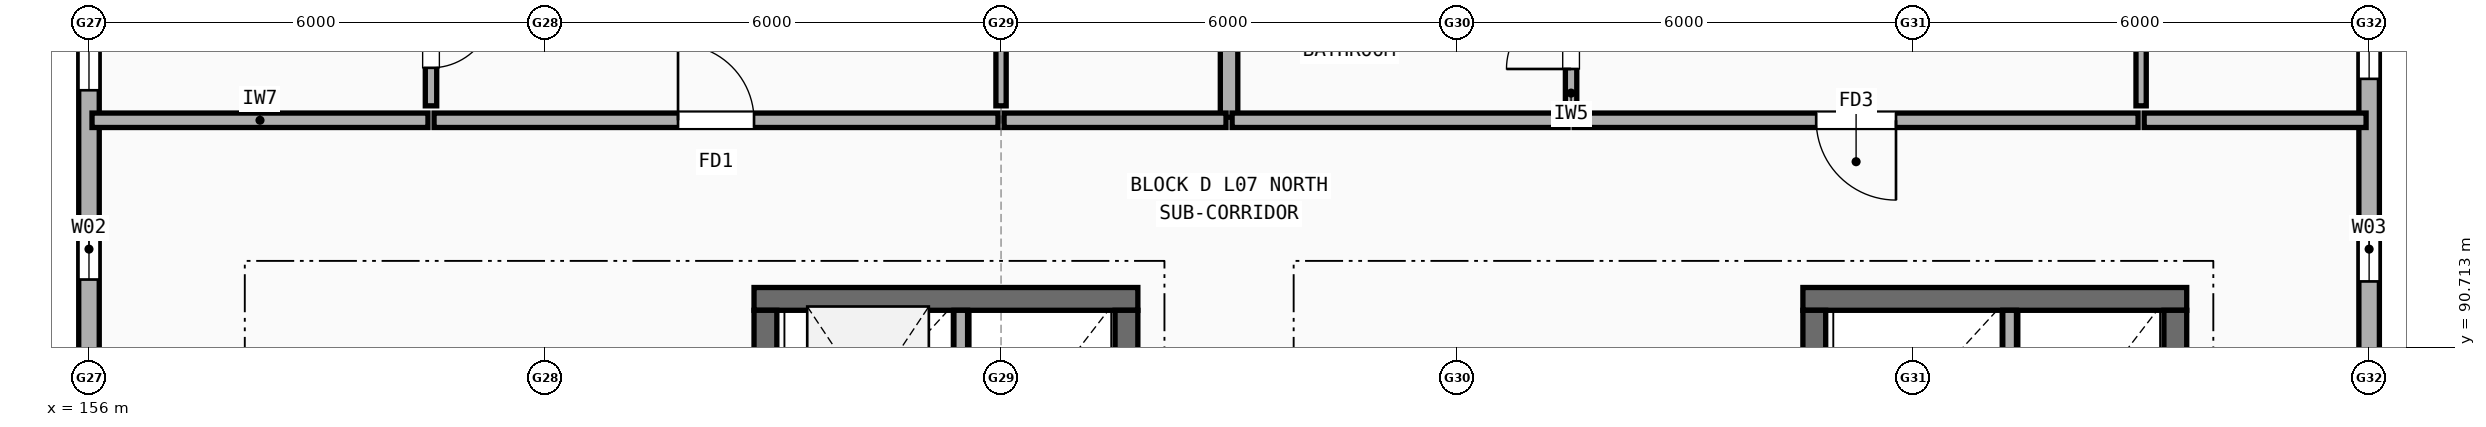
"""IFC4 building model, lengths in metres.
Left out: names, types, materials, properties, quantities, classifications, styles, units other than length and angle.
Written with IfcOpenShell. Run it as: python <this file> out.ifc"""

import sys

from ifc_helpers import new_model, si_unit, direction, frame, frame_2d, origin, place, context, subcontext, project, spatial, rectangle, extrude, element, fill, save


model = new_model("IFC4")
c1 = context("Model", 3, precision=1e-05, world=origin(), true_north=direction((0.0, 1.0)))
c2 = subcontext(c1, "Body", "Model", "MODEL_VIEW")
j1 = project(units=[si_unit("LENGTHUNIT", "METRE"), si_unit("PLANEANGLEUNIT", "RADIAN")], contexts=[c1])
p1 = place(None, origin())
s1 = spatial("IfcSite", under=j1, at=p1, CompositionType="ELEMENT")
p2 = place(p1, origin())
s2 = spatial("IfcBuilding", under=s1, at=p2, CompositionType="ELEMENT")
p3 = place(p2, frame((0.0, 0.0, 23.7)))
s3 = spatial("IfcBuildingStorey", under=s2, at=p3, CompositionType="ELEMENT", Elevation=23.7)
p4 = place(p3, frame((186.0, 90.35, 0.0), z_axis=(0.0, 0.0, 1.0), x_axis=(0.0, 1.0, 0.0)))
e1 = element("IfcWall", 1, at=p4, inside=s3, PredefinedType="STANDARD", context=c2, shape_type="SweptSolid", body=[
    extrude(rectangle(XDim=5.3, YDim=0.27, at=frame_2d((2.65, 0.0))), origin(), (0.0, 0.0, 1.0), 2.457),
])
p5 = place(p4, frame((1.23, 0.0, 0.9)))
e2 = element("IfcOpeningElement", 2, at=p5, cuts=e1, PredefinedType="OPENING", context=c2, shape_type="SweptSolid", body=[
    extrude(rectangle(XDim=0.85, YDim=1.25, at=frame_2d((0.425, 0.625))), frame((0.0, 0.145, 0.0), z_axis=(0.0, -1.0, 0.0), x_axis=(1.0, 0.0, 0.0)), (0.0, 0.0, 1.0), 0.29),
])
p6 = place(p4, frame((3.895, 0.0, 0.9)))
e3 = element("IfcOpeningElement", 3, at=p6, cuts=e1, PredefinedType="OPENING", context=c2, shape_type="SweptSolid", body=[
    extrude(rectangle(XDim=0.9, YDim=1.3, at=frame_2d((0.45, 0.65))), frame((0.0, 0.145, 0.0), z_axis=(0.0, -1.0, 0.0), x_axis=(1.0, 0.0, 0.0)), (0.0, 0.0, 1.0), 0.29),
])
p7 = place(p3, frame((156.0, 95.65, 0.0), z_axis=(0.0, 0.0, 1.0), x_axis=(0.0, -1.0, 0.0)))
e4 = element("IfcWall", 4, at=p7, inside=s3, PredefinedType="STANDARD", context=c2, shape_type="SweptSolid", body=[
    extrude(rectangle(XDim=5.3, YDim=0.27, at=frame_2d((2.65, 0.0))), origin(), (0.0, 0.0, 1.0), 2.457),
])
p8 = place(p7, frame((0.355, 0.0, 0.9)))
e5 = element("IfcOpeningElement", 5, at=p8, cuts=e4, PredefinedType="OPENING", context=c2, shape_type="SweptSolid", body=[
    extrude(rectangle(XDim=1.2, YDim=1.35, at=frame_2d((0.6, 0.675))), frame((0.0, 0.145, 0.0), z_axis=(0.0, -1.0, 0.0), x_axis=(1.0, 0.0, 0.0)), (0.0, 0.0, 1.0), 0.29),
])
p9 = place(p7, frame((3.245, 0.0, 0.9)))
e6 = element("IfcOpeningElement", 6, at=p9, cuts=e4, PredefinedType="OPENING", context=c2, shape_type="SweptSolid", body=[
    extrude(rectangle(XDim=0.8, YDim=1.2, at=frame_2d((0.4, 0.6))), frame((0.0, 0.145, 0.0), z_axis=(0.0, -1.0, 0.0), x_axis=(1.0, 0.0, 0.0)), (0.0, 0.0, 1.0), 0.29),
])
p10 = place(p3, frame((169.8, 91.35, 0.0), z_axis=(0.0, 0.0, 1.0), x_axis=(-1.0, 0.0, 0.0)))
e7 = element("IfcWall", 7, at=p10, inside=s3, PredefinedType="SHEAR", context=c2, shape_type="SweptSolid", body=[
    extrude(rectangle(XDim=5.05, YDim=0.3, at=frame_2d((2.525, 0.0))), origin(), (0.0, 0.0, 1.0), 2.975),
])
p11 = place(p3, frame((169.65, 84.75, 0.0), z_axis=(0.0, 0.0, 1.0), x_axis=(0.0, 1.0, 0.0)))
e8 = element("IfcWall", 8, at=p11, inside=s3, PredefinedType="SHEAR", context=c2, shape_type="SweptSolid", body=[
    extrude(rectangle(XDim=6.45, YDim=0.3, at=frame_2d((3.225, 0.0))), origin(), (0.0, 0.0, 1.0), 2.975),
])
p12 = place(p3, frame((164.9, 87.75, 0.0), z_axis=(0.0, 0.0, 1.0), x_axis=(0.0, 1.0, 0.0)))
e9 = element("IfcWall", 9, at=p12, inside=s3, PredefinedType="SHEAR", context=c2, shape_type="SweptSolid", body=[
    extrude(rectangle(XDim=3.45, YDim=0.3, at=frame_2d((1.725, 0.0))), origin(), (0.0, 0.0, 1.0), 2.975),
])
p13 = place(p3, frame((167.47, 88.94, 0.0), z_axis=(0.0, 0.0, 1.0), x_axis=(0.0, 1.0, 0.0)))
e10 = element("IfcWall", 10, at=p13, inside=s3, PredefinedType="SOLIDWALL", context=c2, shape_type="SweptSolid", body=[
    extrude(rectangle(XDim=2.26, YDim=0.18, at=frame_2d((1.13, 0.0))), origin(), (0.0, 0.0, 1.0), 2.975),
])
p14 = place(p3, frame((183.6, 91.35, 0.0), z_axis=(0.0, 0.0, 1.0), x_axis=(-1.0, 0.0, 0.0)))
e11 = element("IfcWall", 11, at=p14, inside=s3, PredefinedType="SHEAR", context=c2, shape_type="SweptSolid", body=[
    extrude(rectangle(XDim=5.05, YDim=0.3, at=frame_2d((2.525, 0.0))), origin(), (0.0, 0.0, 1.0), 2.975),
])
p15 = place(p3, frame((183.45, 84.75, 0.0), z_axis=(0.0, 0.0, 1.0), x_axis=(0.0, 1.0, 0.0)))
e12 = element("IfcWall", 12, at=p15, inside=s3, PredefinedType="SHEAR", context=c2, shape_type="SweptSolid", body=[
    extrude(rectangle(XDim=6.45, YDim=0.3, at=frame_2d((3.225, 0.0))), origin(), (0.0, 0.0, 1.0), 2.975),
])
p16 = place(p3, frame((178.7, 87.65, 0.0), z_axis=(0.0, 0.0, 1.0), x_axis=(0.0, 1.0, 0.0)))
e13 = element("IfcWall", 13, at=p16, inside=s3, PredefinedType="SHEAR", context=c2, shape_type="SweptSolid", body=[
    extrude(rectangle(XDim=3.55, YDim=0.3, at=frame_2d((1.775, 0.0))), origin(), (0.0, 0.0, 1.0), 2.975),
])
p17 = place(p3, frame((181.27, 88.94, 0.0), z_axis=(0.0, 0.0, 1.0), x_axis=(0.0, 1.0, 0.0)))
e14 = element("IfcWall", 14, at=p17, inside=s3, PredefinedType="SOLIDWALL", context=c2, shape_type="SweptSolid", body=[
    extrude(rectangle(XDim=2.26, YDim=0.18, at=frame_2d((1.13, 0.0))), origin(), (0.0, 0.0, 1.0), 2.975),
])
p18 = place(p3, frame((171.0, 93.74, 0.0), z_axis=(0.0, 0.0, 1.0), x_axis=(0.0, 1.0, 0.0)))
e15 = element("IfcWall", 15, at=p18, inside=s3, PredefinedType="SOLIDWALL", context=c2, shape_type="SweptSolid", body=[
    extrude(rectangle(XDim=7.87, YDim=0.23, at=frame_2d((3.935, 0.0))), origin(), (0.0, 0.0, 1.0), 2.548),
])
p19 = place(p3, frame((156.04, 93.7, 0.0), z_axis=(0.0, 0.0, 1.0), x_axis=(1.0, 0.0, 0.0)))
e16 = element("IfcWall", 16, at=p19, inside=s3, PredefinedType="SOLIDWALL", context=c2, shape_type="SweptSolid", body=[
    extrude(rectangle(XDim=4.42, YDim=0.19, at=frame_2d((2.21, 0.0))), origin(), (0.0, 0.0, 1.0), 2.457),
])
p20 = place(p3, frame((160.54, 93.7, 0.0), z_axis=(0.0, 0.0, 1.0), x_axis=(1.0, 0.0, 0.0)))
e17 = element("IfcWall", 17, at=p20, inside=s3, PredefinedType="SOLIDWALL", context=c2, shape_type="SweptSolid", body=[
    extrude(rectangle(XDim=7.42, YDim=0.19, at=frame_2d((3.71, 0.0))), origin(), (0.0, 0.0, 1.0), 2.508),
])
p21 = place(p20, frame((3.21, 0.0, 0.0)))
e18 = element("IfcOpeningElement", 18, at=p21, cuts=e17, PredefinedType="OPENING", context=c2, shape_type="SweptSolid", body=[
    extrude(rectangle(XDim=1.0, YDim=2.15, at=frame_2d((0.5, 1.075))), frame((0.0, 0.105, 0.0), z_axis=(0.0, -1.0, 0.0), x_axis=(1.0, 0.0, 0.0)), (0.0, 0.0, 1.0), 0.21),
])
p22 = place(p3, frame((160.5, 93.89, 0.0), z_axis=(0.0, 0.0, 1.0), x_axis=(0.0, 1.0, 0.0)))
e19 = element("IfcWall", 19, at=p22, inside=s3, PredefinedType="PARTITIONING", context=c2, shape_type="SweptSolid", body=[
    extrude(rectangle(XDim=1.82, YDim=0.15, at=frame_2d((0.91, 0.0))), origin(), (0.0, 0.0, 1.0), 2.975),
])
p23 = place(p22, frame((0.5, 0.0, 0.0)))
e20 = element("IfcOpeningElement", 20, at=p23, cuts=e19, PredefinedType="OPENING", context=c2, shape_type="SweptSolid", body=[
    extrude(rectangle(XDim=0.82, YDim=2.08, at=frame_2d((0.41, 1.04))), frame((0.0, 0.085, 0.0), z_axis=(0.0, -1.0, 0.0), x_axis=(1.0, 0.0, 0.0)), (0.0, 0.0, 1.0), 0.17),
])
p24 = place(p3, frame((168.04, 93.7, 0.0), z_axis=(0.0, 0.0, 1.0), x_axis=(1.0, 0.0, 0.0)))
e21 = element("IfcWall", 21, at=p24, inside=s3, PredefinedType="SOLIDWALL", context=c2, shape_type="SweptSolid", body=[
    extrude(rectangle(XDim=2.92, YDim=0.19, at=frame_2d((1.46, 0.0))), origin(), (0.0, 0.0, 1.0), 2.508),
])
p25 = place(p3, frame((168.0, 93.89, 0.0), z_axis=(0.0, 0.0, 1.0), x_axis=(0.0, 1.0, 0.0)))
e22 = element("IfcWall", 22, at=p25, inside=s3, PredefinedType="PARTITIONING", context=c2, shape_type="SweptSolid", body=[
    extrude(rectangle(XDim=7.6, YDim=0.135, at=frame_2d((3.8, 0.0))), origin(), (0.0, 0.0, 1.0), 2.508),
])
p26 = place(p25, frame((3.65, 0.0, 0.0)))
e23 = element("IfcOpeningElement", 23, at=p26, cuts=e22, PredefinedType="OPENING", context=c2, shape_type="SweptSolid", body=[
    extrude(rectangle(XDim=0.88, YDim=2.1, at=frame_2d((0.44, 1.05))), frame((0.0, 0.077, 0.0), z_axis=(0.0, -1.0, 0.0), x_axis=(1.0, 0.0, 0.0)), (0.0, 0.0, 1.0), 0.155),
])
p27 = place(p3, frame((171.04, 93.7, 0.0), z_axis=(0.0, 0.0, 1.0), x_axis=(1.0, 0.0, 0.0)))
e24 = element("IfcWall", 24, at=p27, inside=s3, PredefinedType="SOLIDWALL", context=c2, shape_type="SweptSolid", body=[
    extrude(rectangle(XDim=4.42, YDim=0.19, at=frame_2d((2.21, 0.0))), origin(), (0.0, 0.0, 1.0), 2.975),
])
p28 = place(p3, frame((175.54, 93.7, 0.0), z_axis=(0.0, 0.0, 1.0), x_axis=(1.0, 0.0, 0.0)))
e25 = element("IfcWall", 25, at=p28, inside=s3, PredefinedType="SOLIDWALL", context=c2, shape_type="SweptSolid", body=[
    extrude(rectangle(XDim=7.42, YDim=0.19, at=frame_2d((3.71, 0.0))), origin(), (0.0, 0.0, 1.0), 2.975),
])
p29 = place(p28, frame((3.185, 0.0, 0.0)))
e26 = element("IfcOpeningElement", 26, at=p29, cuts=e25, PredefinedType="OPENING", context=c2, shape_type="SweptSolid", body=[
    extrude(rectangle(XDim=1.05, YDim=2.15, at=frame_2d((0.525, 1.075))), frame((0.0, 0.105, 0.0), z_axis=(0.0, -1.0, 0.0), x_axis=(1.0, 0.0, 0.0)), (0.0, 0.0, 1.0), 0.21),
])
p30 = place(p3, frame((175.5, 93.89, 0.0), z_axis=(0.0, 0.0, 1.0), x_axis=(0.0, 1.0, 0.0)))
e27 = element("IfcWall", 27, at=p30, inside=s3, PredefinedType="PARTITIONING", context=c2, shape_type="SweptSolid", body=[
    extrude(rectangle(XDim=1.82, YDim=0.15, at=frame_2d((0.91, 0.0))), origin(), (0.0, 0.0, 1.0), 2.975),
])
p31 = place(p30, frame((0.485, 0.0, 0.0)))
e28 = element("IfcOpeningElement", 28, at=p31, cuts=e27, PredefinedType="OPENING", context=c2, shape_type="SweptSolid", body=[
    extrude(rectangle(XDim=0.85, YDim=2.1, at=frame_2d((0.425, 1.05))), frame((0.0, 0.085, 0.0), z_axis=(0.0, -1.0, 0.0), x_axis=(1.0, 0.0, 0.0)), (0.0, 0.0, 1.0), 0.17),
])
p32 = place(p3, frame((183.04, 93.7, 0.0), z_axis=(0.0, 0.0, 1.0), x_axis=(1.0, 0.0, 0.0)))
e29 = element("IfcWall", 29, at=p32, inside=s3, PredefinedType="SOLIDWALL", context=c2, shape_type="SweptSolid", body=[
    extrude(rectangle(XDim=2.92, YDim=0.19, at=frame_2d((1.46, 0.0))), origin(), (0.0, 0.0, 1.0), 2.457),
])
p33 = place(p3, frame((183.0, 93.89, 0.0), z_axis=(0.0, 0.0, 1.0), x_axis=(0.0, 1.0, 0.0)))
e30 = element("IfcWall", 30, at=p33, inside=s3, PredefinedType="PARTITIONING", context=c2, shape_type="SweptSolid", body=[
    extrude(rectangle(XDim=7.92, YDim=0.135, at=frame_2d((3.96, 0.0))), origin(), (0.0, 0.0, 1.0), 2.408),
])
p34 = place(p33, frame((3.65, 0.0, 0.0)))
e31 = element("IfcOpeningElement", 31, at=p34, cuts=e30, PredefinedType="OPENING", context=c2, shape_type="SweptSolid", body=[
    extrude(rectangle(XDim=0.9, YDim=2.1, at=frame_2d((0.45, 1.05))), frame((0.0, 0.077, 0.0), z_axis=(0.0, -1.0, 0.0), x_axis=(1.0, 0.0, 0.0)), (0.0, 0.0, 1.0), 0.155),
])
p35 = place(p5, origin())
e32 = element("IfcWindow", 32, at=p35, inside=s3, PartitioningType="SINGLE_PANEL", PredefinedType="WINDOW", context=c2, shape_type="SweptSolid", body=[
    extrude(rectangle(XDim=0.85, YDim=1.25, at=frame_2d((0.425, 0.625))), frame((0.0, 0.03, 0.0), z_axis=(0.0, -1.0, 0.0), x_axis=(1.0, 0.0, 0.0)), (0.0, 0.0, 1.0), 0.06),
])
fill(e2, e32)
p36 = place(p6, origin())
e33 = element("IfcWindow", 33, at=p36, inside=s3, PartitioningType="SINGLE_PANEL", PredefinedType="WINDOW", context=c2, shape_type="SweptSolid", body=[
    extrude(rectangle(XDim=0.9, YDim=1.3, at=frame_2d((0.45, 0.65))), frame((0.0, 0.03, 0.0), z_axis=(0.0, -1.0, 0.0), x_axis=(1.0, 0.0, 0.0)), (0.0, 0.0, 1.0), 0.06),
])
fill(e3, e33)
p37 = place(p8, origin())
e34 = element("IfcWindow", 34, at=p37, inside=s3, PartitioningType="SINGLE_PANEL", PredefinedType="WINDOW", context=c2, shape_type="SweptSolid", body=[
    extrude(rectangle(XDim=1.2, YDim=1.35, at=frame_2d((0.6, 0.675))), frame((0.0, 0.03, 0.0), z_axis=(0.0, -1.0, 0.0), x_axis=(1.0, 0.0, 0.0)), (0.0, 0.0, 1.0), 0.06),
])
fill(e5, e34)
p38 = place(p9, origin())
e35 = element("IfcWindow", 35, at=p38, inside=s3, PartitioningType="SINGLE_PANEL", PredefinedType="WINDOW", context=c2, shape_type="SweptSolid", body=[
    extrude(rectangle(XDim=0.8, YDim=1.2, at=frame_2d((0.4, 0.6))), frame((0.0, 0.03, 0.0), z_axis=(0.0, -1.0, 0.0), x_axis=(1.0, 0.0, 0.0)), (0.0, 0.0, 1.0), 0.06),
])
fill(e6, e35)
p39 = place(p21, origin())
e36 = element("IfcDoor", 36, at=p39, inside=s3, OperationType="SINGLE_SWING_LEFT", PredefinedType="DOOR", context=c2, shape_type="SweptSolid", body=[
    extrude(rectangle(XDim=1.0, YDim=2.15, at=frame_2d((0.5, 1.075))), frame((0.0, 0.025, 0.0), z_axis=(0.0, -1.0, 0.0), x_axis=(1.0, 0.0, 0.0)), (0.0, 0.0, 1.0), 0.05),
])
fill(e18, e36)
p40 = place(p23, origin())
e37 = element("IfcDoor", 37, at=p40, inside=s3, OperationType="SINGLE_SWING_RIGHT", PredefinedType="DOOR", context=c2, shape_type="SweptSolid", body=[
    extrude(rectangle(XDim=0.82, YDim=2.08, at=frame_2d((0.41, 1.04))), frame((0.0, 0.025, 0.0), z_axis=(0.0, -1.0, 0.0), x_axis=(1.0, 0.0, 0.0)), (0.0, 0.0, 1.0), 0.05),
])
fill(e20, e37)
p41 = place(p29, origin())
e38 = element("IfcDoor", 38, at=p41, inside=s3, OperationType="SINGLE_SWING_RIGHT", PredefinedType="DOOR", context=c2, shape_type="SweptSolid", body=[
    extrude(rectangle(XDim=1.05, YDim=2.15, at=frame_2d((0.525, 1.075))), frame((0.0, 0.025, 0.0), z_axis=(0.0, -1.0, 0.0), x_axis=(1.0, 0.0, 0.0)), (0.0, 0.0, 1.0), 0.05),
])
fill(e26, e38)
p42 = place(p31, origin())
e39 = element("IfcDoor", 39, at=p42, inside=s3, OperationType="SINGLE_SWING_LEFT", PredefinedType="DOOR", context=c2, shape_type="SweptSolid", body=[
    extrude(rectangle(XDim=0.85, YDim=2.1, at=frame_2d((0.425, 1.05))), frame((0.0, 0.025, 0.0), z_axis=(0.0, -1.0, 0.0), x_axis=(1.0, 0.0, 0.0)), (0.0, 0.0, 1.0), 0.05),
])
fill(e28, e39)
save(model, sys.argv[1])
